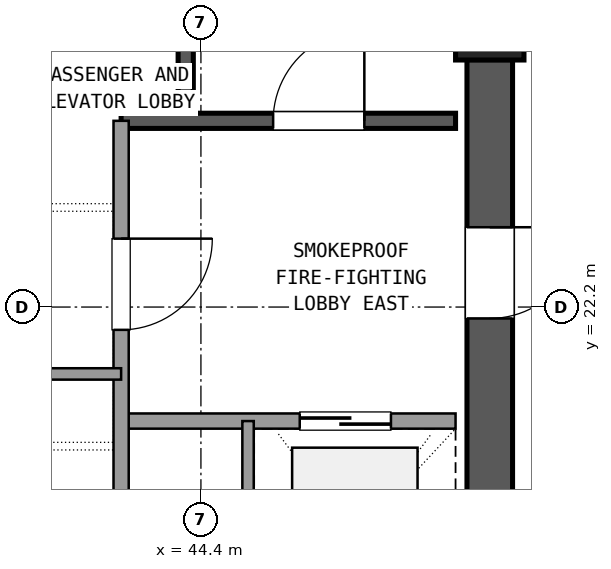
"""IFC4 building model, lengths in metres.
Left out: names, types, materials, properties, quantities, classifications, styles, units other than length and angle.
Written with IfcOpenShell. Run it as: python <this file> out.ifc"""

import sys

from ifc_helpers import new_model, si_unit, direction, frame, frame_2d, origin, origin_2d, place, context, subcontext, project, spatial, rectangle, extrude, element, fill, save


model = new_model("IFC4")
c1 = context("Model", 3, precision=1e-05, world=origin(), true_north=direction((0.0, 1.0)))
c2 = subcontext(c1, "Body", "Model", "MODEL_VIEW")
j1 = project(units=[si_unit("LENGTHUNIT", "METRE"), si_unit("PLANEANGLEUNIT", "RADIAN")], contexts=[c1])
p1 = place(None, origin())
s1 = spatial("IfcSite", under=j1, at=p1, CompositionType="ELEMENT")
p2 = place(p1, origin())
s2 = spatial("IfcBuilding", under=s1, at=p2, CompositionType="ELEMENT")
p3 = place(p2, frame((0.0, 0.0, 192.78)))
s3 = spatial("IfcBuildingStorey", under=s2, at=p3, CompositionType="ELEMENT", Elevation=192.78)
p4 = place(p3, frame((48.2, 25.9, 0.0), z_axis=(0.0, 0.0, 1.0), x_axis=(1.0, 0.0, 0.0)))
e1 = element("IfcColumn", 1, at=p4, inside=s3, PredefinedType="COLUMN", context=c2, shape_type="SweptSolid", body=[
    extrude(rectangle(XDim=0.9, YDim=0.9, at=origin_2d()), origin(), (0.0, 0.0, 1.0), 3.6),
])
p5 = place(p3, frame((48.2, 17.745, 0.0), z_axis=(0.0, 0.0, 1.0), x_axis=(0.0, 1.0, 0.0)))
e2 = element("IfcWall", 2, at=p5, inside=s3, PredefinedType="SHEAR", context=c2, shape_type="SweptSolid", body=[
    extrude(rectangle(XDim=7.71, YDim=0.6, at=frame_2d((3.855, 0.0))), origin(), (0.0, 0.0, 1.0), 3.32),
])
p6 = place(p5, frame((4.305, 0.0, 0.0)))
e3 = element("IfcOpeningElement", 3, at=p6, cuts=e2, PredefinedType="OPENING", context=c2, shape_type="SweptSolid", body=[
    extrude(rectangle(XDim=1.2, YDim=2.15, at=frame_2d((0.6, 1.075))), frame((0.0, 0.31, 0.0), z_axis=(0.0, -1.0, 0.0), x_axis=(1.0, 0.0, 0.0)), (0.0, 0.0, 1.0), 0.62),
])
p7 = place(p3, frame((44.2, 24.65, 0.0), z_axis=(0.0, 0.0, 1.0), x_axis=(0.0, 1.0, 0.0)))
e4 = element("IfcWall", 4, at=p7, inside=s3, PredefinedType="SHEAR", context=c2, shape_type="SweptSolid", body=[
    extrude(rectangle(XDim=9.4, YDim=0.2, at=frame_2d((4.7, 0.0))), origin(), (0.0, 0.0, 1.0), 3.32),
])
p8 = place(p3, frame((43.35, 24.65, 0.0), z_axis=(0.0, 0.0, 1.0), x_axis=(1.0, 0.0, 0.0)))
e5 = element("IfcWall", 5, at=p8, inside=s3, PredefinedType="SHEAR", context=c2, shape_type="SweptSolid", body=[
    extrude(rectangle(XDim=4.4, YDim=0.2, at=frame_2d((2.2, 0.0))), origin(), (0.0, 0.0, 1.0), 3.32),
])
p9 = place(p8, frame((2.0, 0.0, 0.0)))
e6 = element("IfcOpeningElement", 6, at=p9, cuts=e5, PredefinedType="OPENING", context=c2, shape_type="SweptSolid", body=[
    extrude(rectangle(XDim=1.2, YDim=2.15, at=frame_2d((0.6, 1.075))), frame((0.0, 0.11, 0.0), z_axis=(0.0, -1.0, 0.0), x_axis=(1.0, 0.0, 0.0)), (0.0, 0.0, 1.0), 0.22),
])
p10 = place(p3, frame((43.35, 20.7, 0.0), z_axis=(0.0, 0.0, 1.0), x_axis=(1.0, 0.0, 0.0)))
e7 = element("IfcWall", 7, at=p10, inside=s3, PredefinedType="SOLIDWALL", context=c2, shape_type="SweptSolid", body=[
    extrude(rectangle(XDim=4.4, YDim=0.2, at=frame_2d((2.2, 0.0))), origin(), (0.0, 0.0, 1.0), 2.61),
])
p11 = place(p10, frame((2.35, 0.0, 0.0)))
e8 = element("IfcOpeningElement", 8, at=p11, cuts=e7, PredefinedType="OPENING", context=c2, shape_type="SweptSolid", body=[
    extrude(rectangle(XDim=1.2, YDim=2.15, at=frame_2d((0.6, 1.075))), frame((0.0, 0.11, 0.0), z_axis=(0.0, -1.0, 0.0), x_axis=(1.0, 0.0, 0.0)), (0.0, 0.0, 1.0), 0.22),
])
p12 = place(p3, frame((43.35, 17.75, 0.0), z_axis=(0.0, 0.0, 1.0), x_axis=(0.0, 1.0, 0.0)))
e9 = element("IfcWall", 9, at=p12, inside=s3, PredefinedType="SOLIDWALL", context=c2, shape_type="SweptSolid", body=[
    extrude(rectangle(XDim=6.9, YDim=0.2, at=frame_2d((3.45, 0.0))), origin(), (0.0, 0.0, 1.0), 2.61),
])
p13 = place(p12, frame((4.15, 0.0, 0.0)))
e10 = element("IfcOpeningElement", 10, at=p13, cuts=e9, PredefinedType="OPENING", context=c2, shape_type="SweptSolid", body=[
    extrude(rectangle(XDim=1.2, YDim=2.15, at=frame_2d((0.6, 1.075))), frame((0.0, 0.11, 0.0), z_axis=(0.0, -1.0, 0.0), x_axis=(1.0, 0.0, 0.0)), (0.0, 0.0, 1.0), 0.22),
])
p14 = place(p3, frame((45.02, 17.75, 0.0), z_axis=(0.0, 0.0, 1.0), x_axis=(0.0, 1.0, 0.0)))
e11 = element("IfcWall", 11, at=p14, inside=s3, PredefinedType="PARTITIONING", context=c2, shape_type="SweptSolid", body=[
    extrude(rectangle(XDim=2.95, YDim=0.15, at=frame_2d((1.475, 0.0))), origin(), (0.0, 0.0, 1.0), 2.61),
])
p15 = place(p3, frame((37.25, 21.32, 0.0), z_axis=(0.0, 0.0, 1.0), x_axis=(1.0, 0.0, 0.0)))
e12 = element("IfcWall", 12, at=p15, inside=s3, PredefinedType="PARTITIONING", context=c2, shape_type="SweptSolid", body=[
    extrude(rectangle(XDim=6.1, YDim=0.15, at=frame_2d((3.05, 0.0))), origin(), (0.0, 0.0, 1.0), 2.61),
])
p16 = place(p15, frame((0.55, 0.0, 0.0)))
e13 = element("IfcOpeningElement", 13, at=p16, cuts=e12, PredefinedType="OPENING", context=c2, shape_type="SweptSolid", body=[
    extrude(rectangle(XDim=1.0, YDim=2.15, at=frame_2d((0.5, 1.075))), frame((0.0, 0.085, 0.0), z_axis=(0.0, -1.0, 0.0), x_axis=(1.0, 0.0, 0.0)), (0.0, 0.0, 1.0), 0.17),
])
p17 = place(p15, frame((3.15, 0.0, 0.0)))
e14 = element("IfcOpeningElement", 14, at=p17, cuts=e12, PredefinedType="OPENING", context=c2, shape_type="SweptSolid", body=[
    extrude(rectangle(XDim=1.0, YDim=2.15, at=frame_2d((0.5, 1.075))), frame((0.0, 0.085, 0.0), z_axis=(0.0, -1.0, 0.0), x_axis=(1.0, 0.0, 0.0)), (0.0, 0.0, 1.0), 0.17),
])
p18 = place(p9, origin())
e15 = element("IfcDoor", 15, at=p18, inside=s3, OperationType="SINGLE_SWING_RIGHT", PredefinedType="DOOR", context=c2, shape_type="SweptSolid", body=[
    extrude(rectangle(XDim=1.2, YDim=2.15, at=frame_2d((0.6, 1.075))), frame((0.0, 0.025, 0.0), z_axis=(0.0, -1.0, 0.0), x_axis=(1.0, 0.0, 0.0)), (0.0, 0.0, 1.0), 0.05),
])
fill(e6, e15)
p19 = place(p11, origin())
e16 = element("IfcDoor", 16, at=p19, inside=s3, OperationType="SLIDING_TO_RIGHT", PredefinedType="DOOR", context=c2, shape_type="SweptSolid", body=[
    extrude(rectangle(XDim=1.2, YDim=2.15, at=frame_2d((0.6, 1.075))), frame((0.0, 0.025, 0.0), z_axis=(0.0, -1.0, 0.0), x_axis=(1.0, 0.0, 0.0)), (0.0, 0.0, 1.0), 0.05),
])
fill(e8, e16)
p20 = place(p13, frame((1.2, 0.0, 0.0), z_axis=(0.0, 0.0, 1.0), x_axis=(-1.0, 0.0, 0.0)))
e17 = element("IfcDoor", 17, at=p20, inside=s3, OperationType="SINGLE_SWING_RIGHT", PredefinedType="DOOR", context=c2, shape_type="SweptSolid", body=[
    extrude(rectangle(XDim=1.2, YDim=2.15, at=frame_2d((0.6, 1.075))), frame((0.0, 0.025, 0.0), z_axis=(0.0, -1.0, 0.0), x_axis=(1.0, 0.0, 0.0)), (0.0, 0.0, 1.0), 0.05),
])
fill(e10, e17)
p21 = place(p6, frame((1.2, 0.0, 0.0), z_axis=(0.0, 0.0, 1.0), x_axis=(-1.0, 0.0, 0.0)))
e18 = element("IfcDoor", 18, at=p21, inside=s3, OperationType="SINGLE_SWING_RIGHT", PredefinedType="DOOR", context=c2, shape_type="SweptSolid", body=[
    extrude(rectangle(XDim=1.2, YDim=2.15, at=frame_2d((0.6, 1.075))), frame((0.0, 0.025, 0.0), z_axis=(0.0, -1.0, 0.0), x_axis=(1.0, 0.0, 0.0)), (0.0, 0.0, 1.0), 0.05),
])
fill(e3, e18)
save(model, sys.argv[1])
